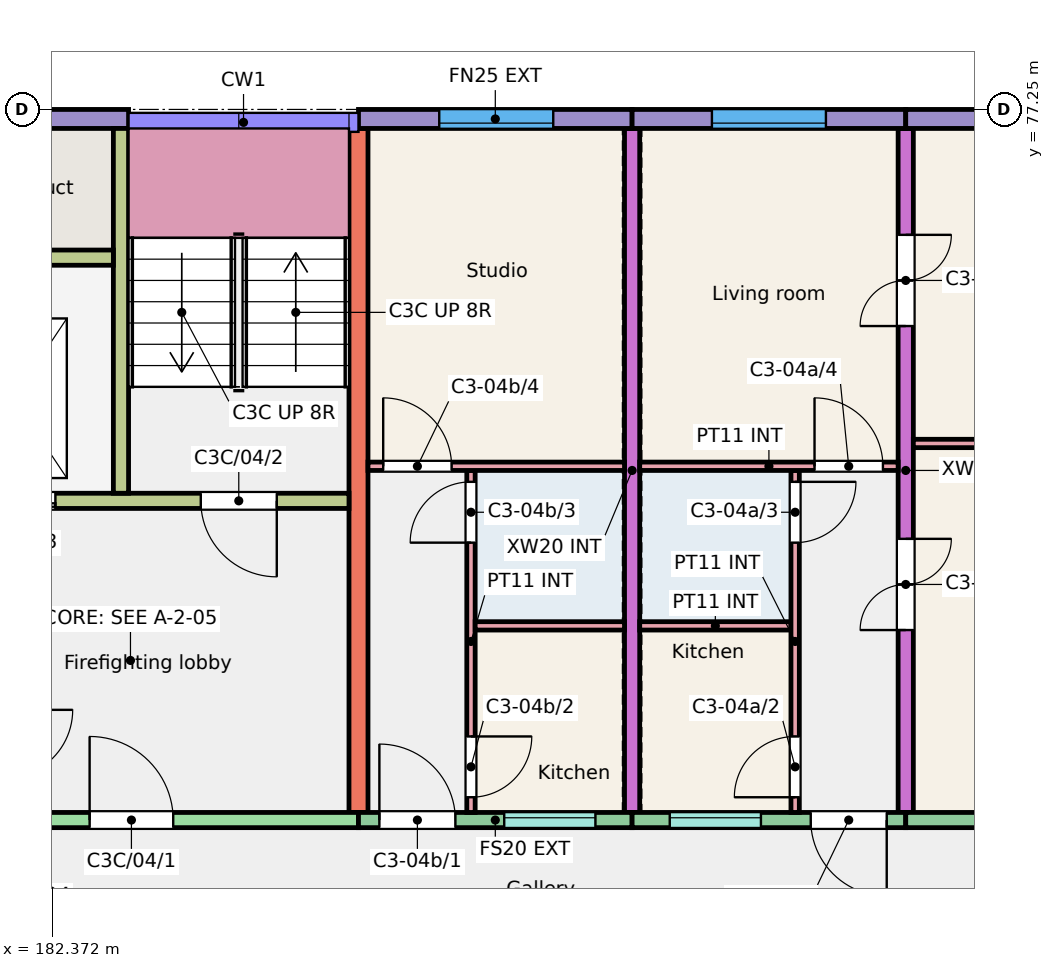
"""IFC4 building model, lengths in metres.
Left out: names, types, materials, properties, quantities, classifications, styles, units other than length and angle.
Written with IfcOpenShell. Run it as: python <this file> out.ifc"""

import sys

from ifc_helpers import new_model, si_unit, direction, frame, frame_2d, origin, place, context, subcontext, project, spatial, rectangle, extrude, element, fill, save


model = new_model("IFC4")
c1 = context("Model", 3, precision=1e-05, world=origin(), true_north=direction((0.0, 1.0)))
c2 = subcontext(c1, "Body", "Model", "MODEL_VIEW")
j1 = project(units=[si_unit("LENGTHUNIT", "METRE"), si_unit("PLANEANGLEUNIT", "RADIAN")], contexts=[c1])
p1 = place(None, origin())
s1 = spatial("IfcSite", under=j1, at=p1, CompositionType="ELEMENT")
p2 = place(p1, origin())
s2 = spatial("IfcBuilding", under=s1, at=p2, CompositionType="ELEMENT")
p3 = place(p2, frame((0.0, 0.0, 12.0)))
s3 = spatial("IfcBuildingStorey", under=s2, at=p3, CompositionType="ELEMENT", Elevation=12.0)
p4 = place(p3, frame((186.4, 68.0, 0.0), z_axis=(0.0, 0.0, 1.0), x_axis=(0.0, 1.0, 0.0)))
e1 = element("IfcWall", 1, at=p4, inside=s3, PredefinedType="SHEAR", context=c2, shape_type="SweptSolid", body=[
    extrude(rectangle(XDim=9.0, YDim=0.25, at=frame_2d((4.5, 0.0))), origin(), (0.0, 0.0, 1.0), 3.0),
])
p5 = place(p3, frame((190.0, 68.0, 0.0), z_axis=(0.0, 0.0, 1.0), x_axis=(0.0, 1.0, 0.0)))
e2 = element("IfcWall", 2, at=p5, inside=s3, PredefinedType="SHEAR", context=c2, shape_type="SweptSolid", body=[
    extrude(rectangle(XDim=9.0, YDim=0.2, at=frame_2d((4.5, 0.0))), origin(), (0.0, 0.0, 1.0), 3.0),
])
p6 = place(p3, frame((193.6, 68.0, 0.0), z_axis=(0.0, 0.0, 1.0), x_axis=(0.0, 1.0, 0.0)))
e3 = element("IfcWall", 3, at=p6, inside=s3, PredefinedType="SHEAR", context=c2, shape_type="SweptSolid", body=[
    extrude(rectangle(XDim=9.0, YDim=0.2, at=frame_2d((4.5, 0.0))), origin(), (0.0, 0.0, 1.0), 3.0),
])
p7 = place(p6, frame((2.4, 0.0, 0.0)))
e4 = element("IfcOpeningElement", 4, at=p7, cuts=e3, PredefinedType="OPENING", context=c2, shape_type="SweptSolid", body=[
    extrude(rectangle(XDim=1.2, YDim=2.1, at=frame_2d((0.6, 1.05))), frame((0.0, 0.11, 0.0), z_axis=(0.0, -1.0, 0.0), x_axis=(1.0, 0.0, 0.0)), (0.0, 0.0, 1.0), 0.22),
])
p8 = place(p6, frame((6.4, 0.0, 0.0)))
e5 = element("IfcOpeningElement", 5, at=p8, cuts=e3, PredefinedType="OPENING", context=c2, shape_type="SweptSolid", body=[
    extrude(rectangle(XDim=1.2, YDim=2.1, at=frame_2d((0.6, 1.05))), frame((0.0, 0.11, 0.0), z_axis=(0.0, -1.0, 0.0), x_axis=(1.0, 0.0, 0.0)), (0.0, 0.0, 1.0), 0.22),
])
p9 = place(p3, frame((180.4, 77.125, 0.0), z_axis=(0.0, 0.0, 1.0), x_axis=(1.0, 0.0, 0.0)))
e6 = element("IfcWall", 6, at=p9, inside=s3, PredefinedType="SOLIDWALL", context=c2, shape_type="SweptSolid", body=[
    extrude(rectangle(XDim=2.975, YDim=0.25, at=frame_2d((1.488, 0.0))), origin(), (0.0, 0.0, 1.0), 3.0),
])
p10 = place(p3, frame((180.55, 67.9, 0.0), z_axis=(0.0, 0.0, 1.0), x_axis=(1.0, 0.0, 0.0)))
e7 = element("IfcWall", 7, at=p10, inside=s3, PredefinedType="SHEAR", context=c2, shape_type="SweptSolid", body=[
    extrude(rectangle(XDim=5.85, YDim=0.2, at=frame_2d((2.925, 0.0))), origin(), (0.0, 0.0, 1.0), 3.0),
])
p11 = place(p10, frame((2.312, 0.0, 0.0)))
e8 = element("IfcOpeningElement", 8, at=p11, cuts=e7, PredefinedType="OPENING", context=c2, shape_type="SweptSolid", body=[
    extrude(rectangle(XDim=1.1, YDim=2.1, at=frame_2d((0.55, 1.05))), frame((0.0, 0.11, 0.0), z_axis=(0.0, -1.0, 0.0), x_axis=(1.0, 0.0, 0.0)), (0.0, 0.0, 1.0), 0.22),
])
p12 = place(p3, frame((180.55, 72.1, 0.0), z_axis=(0.0, 0.0, 1.0), x_axis=(1.0, 0.0, 0.0)))
e9 = element("IfcWall", 9, at=p12, inside=s3, PredefinedType="SHEAR", context=c2, shape_type="SweptSolid", body=[
    extrude(rectangle(XDim=5.725, YDim=0.2, at=frame_2d((2.862, 0.0))), origin(), (0.0, 0.0, 1.0), 3.0),
])
p13 = place(p12, frame((3.775, 0.0, 0.0)))
e10 = element("IfcOpeningElement", 10, at=p13, cuts=e9, PredefinedType="OPENING", context=c2, shape_type="SweptSolid", body=[
    extrude(rectangle(XDim=1.0, YDim=2.1, at=frame_2d((0.5, 1.05))), frame((0.0, 0.11, 0.0), z_axis=(0.0, -1.0, 0.0), x_axis=(1.0, 0.0, 0.0)), (0.0, 0.0, 1.0), 0.22),
])
p14 = place(p12, frame((0.762, 0.0, 0.0)))
e11 = element("IfcOpeningElement", 11, at=p14, cuts=e9, PredefinedType="OPENING", context=c2, shape_type="SweptSolid", body=[
    extrude(rectangle(XDim=1.1, YDim=2.1, at=frame_2d((0.55, 1.05))), frame((0.0, 0.11, 0.0), z_axis=(0.0, -1.0, 0.0), x_axis=(1.0, 0.0, 0.0)), (0.0, 0.0, 1.0), 0.22),
])
p15 = place(p3, frame((183.275, 72.2, 0.0), z_axis=(0.0, 0.0, 1.0), x_axis=(0.0, 1.0, 0.0)))
e12 = element("IfcWall", 12, at=p15, inside=s3, PredefinedType="SHEAR", context=c2, shape_type="SweptSolid", body=[
    extrude(rectangle(XDim=4.8, YDim=0.2, at=frame_2d((2.4, 0.0))), origin(), (0.0, 0.0, 1.0), 3.0),
])
p16 = place(p3, frame((180.55, 75.3, 0.0), z_axis=(0.0, 0.0, 1.0), x_axis=(1.0, 0.0, 0.0)))
e13 = element("IfcWall", 13, at=p16, inside=s3, PredefinedType="SHEAR", context=c2, shape_type="SweptSolid", body=[
    extrude(rectangle(XDim=2.625, YDim=0.2, at=frame_2d((1.312, 0.0))), origin(), (0.0, 0.0, 1.0), 3.0),
])
p17 = place(p3, frame((186.4, 77.125, 0.0), z_axis=(0.0, 0.0, 1.0), x_axis=(1.0, 0.0, 0.0)))
e14 = element("IfcWall", 14, at=p17, inside=s3, PredefinedType="SOLIDWALL", context=c2, shape_type="SweptSolid", body=[
    extrude(rectangle(XDim=3.6, YDim=0.25, at=frame_2d((1.8, 0.0))), origin(), (0.0, 0.0, 1.0), 3.0),
])
p18 = place(p17, frame((1.062, 0.0, 0.9)))
e15 = element("IfcOpeningElement", 15, at=p18, cuts=e14, PredefinedType="OPENING", context=c2, shape_type="SweptSolid", body=[
    extrude(rectangle(XDim=1.5, YDim=1.5, at=frame_2d((0.75, 0.75))), frame((0.0, 0.135, 0.0), z_axis=(0.0, -1.0, 0.0), x_axis=(1.0, 0.0, 0.0)), (0.0, 0.0, 1.0), 0.27),
])
p19 = place(p3, frame((186.4, 67.9, 0.0), z_axis=(0.0, 0.0, 1.0), x_axis=(1.0, 0.0, 0.0)))
e16 = element("IfcWall", 16, at=p19, inside=s3, PredefinedType="SOLIDWALL", context=c2, shape_type="SweptSolid", body=[
    extrude(rectangle(XDim=3.6, YDim=0.2, at=frame_2d((1.8, 0.0))), origin(), (0.0, 0.0, 1.0), 3.0),
])
p20 = place(p19, frame((1.917, 0.0, 1.1)))
e17 = element("IfcOpeningElement", 17, at=p20, cuts=e16, PredefinedType="OPENING", context=c2, shape_type="SweptSolid", body=[
    extrude(rectangle(XDim=1.2, YDim=1.3, at=frame_2d((0.6, 0.65))), frame((0.0, 0.11, 0.0), z_axis=(0.0, -1.0, 0.0), x_axis=(1.0, 0.0, 0.0)), (0.0, 0.0, 1.0), 0.22),
])
p21 = place(p19, frame((0.275, 0.0, 0.0)))
e18 = element("IfcOpeningElement", 18, at=p21, cuts=e16, PredefinedType="OPENING", context=c2, shape_type="SweptSolid", body=[
    extrude(rectangle(XDim=1.0, YDim=2.1, at=frame_2d((0.5, 1.05))), frame((0.0, 0.11, 0.0), z_axis=(0.0, -1.0, 0.0), x_axis=(1.0, 0.0, 0.0)), (0.0, 0.0, 1.0), 0.22),
])
p22 = place(p3, frame((190.0, 77.125, 0.0), z_axis=(0.0, 0.0, 1.0), x_axis=(1.0, 0.0, 0.0)))
e19 = element("IfcWall", 19, at=p22, inside=s3, PredefinedType="SOLIDWALL", context=c2, shape_type="SweptSolid", body=[
    extrude(rectangle(XDim=3.6, YDim=0.25, at=frame_2d((1.8, 0.0))), origin(), (0.0, 0.0, 1.0), 3.0),
])
p23 = place(p22, frame((1.05, 0.0, 0.9)))
e20 = element("IfcOpeningElement", 20, at=p23, cuts=e19, PredefinedType="OPENING", context=c2, shape_type="SweptSolid", body=[
    extrude(rectangle(XDim=1.5, YDim=1.5, at=frame_2d((0.75, 0.75))), frame((0.0, 0.135, 0.0), z_axis=(0.0, -1.0, 0.0), x_axis=(1.0, 0.0, 0.0)), (0.0, 0.0, 1.0), 0.27),
])
p24 = place(p3, frame((190.0, 67.9, 0.0), z_axis=(0.0, 0.0, 1.0), x_axis=(1.0, 0.0, 0.0)))
e21 = element("IfcWall", 21, at=p24, inside=s3, PredefinedType="SOLIDWALL", context=c2, shape_type="SweptSolid", body=[
    extrude(rectangle(XDim=3.6, YDim=0.2, at=frame_2d((1.8, 0.0))), origin(), (0.0, 0.0, 1.0), 3.0),
])
p25 = place(p24, frame((0.495, 0.0, 1.1)))
e22 = element("IfcOpeningElement", 22, at=p25, cuts=e21, PredefinedType="OPENING", context=c2, shape_type="SweptSolid", body=[
    extrude(rectangle(XDim=1.2, YDim=1.3, at=frame_2d((0.6, 0.65))), frame((0.0, 0.11, 0.0), z_axis=(0.0, -1.0, 0.0), x_axis=(1.0, 0.0, 0.0)), (0.0, 0.0, 1.0), 0.22),
])
p26 = place(p24, frame((2.35, 0.0, 0.0)))
e23 = element("IfcOpeningElement", 23, at=p26, cuts=e21, PredefinedType="OPENING", context=c2, shape_type="SweptSolid", body=[
    extrude(rectangle(XDim=1.0, YDim=2.1, at=frame_2d((0.5, 1.05))), frame((0.0, 0.11, 0.0), z_axis=(0.0, -1.0, 0.0), x_axis=(1.0, 0.0, 0.0)), (0.0, 0.0, 1.0), 0.22),
])
p27 = place(p3, frame((193.6, 77.125, 0.0), z_axis=(0.0, 0.0, 1.0), x_axis=(1.0, 0.0, 0.0)))
e24 = element("IfcWall", 24, at=p27, inside=s3, PredefinedType="SOLIDWALL", context=c2, shape_type="SweptSolid", body=[
    extrude(rectangle(XDim=3.6, YDim=0.25, at=frame_2d((1.8, 0.0))), origin(), (0.0, 0.0, 1.0), 3.0),
])
p28 = place(p27, frame((1.025, 0.0, 0.9)))
e25 = element("IfcOpeningElement", 25, at=p28, cuts=e24, PredefinedType="OPENING", context=c2, shape_type="SweptSolid", body=[
    extrude(rectangle(XDim=1.5, YDim=1.5, at=frame_2d((0.75, 0.75))), frame((0.0, 0.135, 0.0), z_axis=(0.0, -1.0, 0.0), x_axis=(1.0, 0.0, 0.0)), (0.0, 0.0, 1.0), 0.27),
])
p29 = place(p3, frame((193.6, 67.9, 0.0), z_axis=(0.0, 0.0, 1.0), x_axis=(1.0, 0.0, 0.0)))
e26 = element("IfcWall", 26, at=p29, inside=s3, PredefinedType="SOLIDWALL", context=c2, shape_type="SweptSolid", body=[
    extrude(rectangle(XDim=3.45, YDim=0.2, at=frame_2d((1.725, 0.0))), origin(), (0.0, 0.0, 1.0), 3.0),
])
p30 = place(p29, frame((1.025, 0.0, 0.9)))
e27 = element("IfcOpeningElement", 27, at=p30, cuts=e26, PredefinedType="OPENING", context=c2, shape_type="SweptSolid", body=[
    extrude(rectangle(XDim=1.5, YDim=1.5, at=frame_2d((0.75, 0.75))), frame((0.0, 0.11, 0.0), z_axis=(0.0, -1.0, 0.0), x_axis=(1.0, 0.0, 0.0)), (0.0, 0.0, 1.0), 0.22),
])
p31 = place(p3, frame((190.1, 70.455, 0.0), z_axis=(0.0, 0.0, 1.0), x_axis=(1.0, 0.0, 0.0)))
e28 = element("IfcWall", 28, at=p31, inside=s3, PredefinedType="PARTITIONING", context=c2, shape_type="SweptSolid", body=[
    extrude(rectangle(XDim=1.99, YDim=0.11, at=frame_2d((0.995, 0.0))), origin(), (0.0, 0.0, 1.0), 2.8),
])
p32 = place(p3, frame((192.145, 68.0, 0.0), z_axis=(0.0, 0.0, 1.0), x_axis=(0.0, 1.0, 0.0)))
e29 = element("IfcWall", 29, at=p32, inside=s3, PredefinedType="PARTITIONING", context=c2, shape_type="SweptSolid", body=[
    extrude(rectangle(XDim=4.5, YDim=0.11, at=frame_2d((2.25, 0.0))), origin(), (0.0, 0.0, 1.0), 2.8),
])
p33 = place(p32, frame((0.2, 0.0, 0.0)))
e30 = element("IfcOpeningElement", 30, at=p33, cuts=e29, PredefinedType="OPENING", context=c2, shape_type="SweptSolid", body=[
    extrude(rectangle(XDim=0.8, YDim=2.1, at=frame_2d((0.4, 1.05))), frame((0.0, 0.065, 0.0), z_axis=(0.0, -1.0, 0.0), x_axis=(1.0, 0.0, 0.0)), (0.0, 0.0, 1.0), 0.13),
])
p34 = place(p32, frame((3.55, 0.0, 0.0)))
e31 = element("IfcOpeningElement", 31, at=p34, cuts=e29, PredefinedType="OPENING", context=c2, shape_type="SweptSolid", body=[
    extrude(rectangle(XDim=0.8, YDim=2.1, at=frame_2d((0.4, 1.05))), frame((0.0, 0.065, 0.0), z_axis=(0.0, -1.0, 0.0), x_axis=(1.0, 0.0, 0.0)), (0.0, 0.0, 1.0), 0.13),
])
p35 = place(p3, frame((190.1, 72.555, 0.0), z_axis=(0.0, 0.0, 1.0), x_axis=(1.0, 0.0, 0.0)))
e32 = element("IfcWall", 32, at=p35, inside=s3, PredefinedType="PARTITIONING", context=c2, shape_type="SweptSolid", body=[
    extrude(rectangle(XDim=3.4, YDim=0.11, at=frame_2d((1.7, 0.0))), origin(), (0.0, 0.0, 1.0), 2.8),
])
p36 = place(p35, frame((2.3, 0.0, 0.0)))
e33 = element("IfcOpeningElement", 33, at=p36, cuts=e32, PredefinedType="OPENING", context=c2, shape_type="SweptSolid", body=[
    extrude(rectangle(XDim=0.9, YDim=2.1, at=frame_2d((0.45, 1.05))), frame((0.0, 0.065, 0.0), z_axis=(0.0, -1.0, 0.0), x_axis=(1.0, 0.0, 0.0)), (0.0, 0.0, 1.0), 0.13),
])
p37 = place(p3, frame((193.7, 72.855, 0.0), z_axis=(0.0, 0.0, 1.0), x_axis=(1.0, 0.0, 0.0)))
e34 = element("IfcWall", 34, at=p37, inside=s3, PredefinedType="PARTITIONING", context=c2, shape_type="SweptSolid", body=[
    extrude(rectangle(XDim=3.35, YDim=0.11, at=frame_2d((1.675, 0.0))), origin(), (0.0, 0.0, 1.0), 2.8),
])
p38 = place(p3, frame((187.88, 68.0, 0.0), z_axis=(0.0, 0.0, 1.0), x_axis=(0.0, 1.0, 0.0)))
e35 = element("IfcWall", 35, at=p38, inside=s3, PredefinedType="PARTITIONING", context=c2, shape_type="SweptSolid", body=[
    extrude(rectangle(XDim=4.5, YDim=0.11, at=frame_2d((2.25, 0.0))), origin(), (0.0, 0.0, 1.0), 2.8),
])
p39 = place(p38, frame((0.2, 0.0, 0.0)))
e36 = element("IfcOpeningElement", 36, at=p39, cuts=e35, PredefinedType="OPENING", context=c2, shape_type="SweptSolid", body=[
    extrude(rectangle(XDim=0.8, YDim=2.1, at=frame_2d((0.4, 1.05))), frame((0.0, 0.065, 0.0), z_axis=(0.0, -1.0, 0.0), x_axis=(1.0, 0.0, 0.0)), (0.0, 0.0, 1.0), 0.13),
])
p40 = place(p38, frame((3.55, 0.0, 0.0)))
e37 = element("IfcOpeningElement", 37, at=p40, cuts=e35, PredefinedType="OPENING", context=c2, shape_type="SweptSolid", body=[
    extrude(rectangle(XDim=0.8, YDim=2.1, at=frame_2d((0.4, 1.05))), frame((0.0, 0.065, 0.0), z_axis=(0.0, -1.0, 0.0), x_axis=(1.0, 0.0, 0.0)), (0.0, 0.0, 1.0), 0.13),
])
p41 = place(p3, frame((187.935, 70.455, 0.0), z_axis=(0.0, 0.0, 1.0), x_axis=(1.0, 0.0, 0.0)))
e38 = element("IfcWall", 38, at=p41, inside=s3, PredefinedType="PARTITIONING", context=c2, shape_type="SweptSolid", body=[
    extrude(rectangle(XDim=1.965, YDim=0.11, at=frame_2d((0.982, 0.0))), origin(), (0.0, 0.0, 1.0), 2.8),
])
p42 = place(p3, frame((186.525, 72.555, 0.0), z_axis=(0.0, 0.0, 1.0), x_axis=(1.0, 0.0, 0.0)))
e39 = element("IfcWall", 39, at=p42, inside=s3, PredefinedType="PARTITIONING", context=c2, shape_type="SweptSolid", body=[
    extrude(rectangle(XDim=3.375, YDim=0.11, at=frame_2d((1.688, 0.0))), origin(), (0.0, 0.0, 1.0), 2.8),
])
p43 = place(p42, frame((0.2, 0.0, 0.0)))
e40 = element("IfcOpeningElement", 40, at=p43, cuts=e39, PredefinedType="OPENING", context=c2, shape_type="SweptSolid", body=[
    extrude(rectangle(XDim=0.9, YDim=2.1, at=frame_2d((0.45, 1.05))), frame((0.0, 0.065, 0.0), z_axis=(0.0, -1.0, 0.0), x_axis=(1.0, 0.0, 0.0)), (0.0, 0.0, 1.0), 0.13),
])
p44 = place(p25, origin())
e41 = element("IfcWindow", 41, at=p44, inside=s3, PartitioningType="SINGLE_PANEL", PredefinedType="WINDOW", context=c2, shape_type="SweptSolid", body=[
    extrude(rectangle(XDim=1.2, YDim=1.3, at=frame_2d((0.6, 0.65))), frame((0.0, 0.06, 0.0), z_axis=(0.0, -1.0, 0.0), x_axis=(1.0, 0.0, 0.0)), (0.0, 0.0, 1.0), 0.06),
])
fill(e22, e41)
p45 = place(p23, origin())
e42 = element("IfcWindow", 42, at=p45, inside=s3, PartitioningType="SINGLE_PANEL", PredefinedType="WINDOW", context=c2, shape_type="SweptSolid", body=[
    extrude(rectangle(XDim=1.5, YDim=1.5, at=frame_2d((0.75, 0.75))), frame((0.0, -0.025, 0.0), z_axis=(0.0, -1.0, 0.0), x_axis=(1.0, 0.0, 0.0)), (0.0, 0.0, 1.0), 0.06),
])
fill(e20, e42)
p46 = place(p20, origin())
e43 = element("IfcWindow", 43, at=p46, inside=s3, PartitioningType="SINGLE_PANEL", PredefinedType="WINDOW", context=c2, shape_type="SweptSolid", body=[
    extrude(rectangle(XDim=1.2, YDim=1.3, at=frame_2d((0.6, 0.65))), frame((0.0, 0.06, 0.0), z_axis=(0.0, -1.0, 0.0), x_axis=(1.0, 0.0, 0.0)), (0.0, 0.0, 1.0), 0.06),
])
fill(e17, e43)
p47 = place(p18, origin())
e44 = element("IfcWindow", 44, at=p47, inside=s3, PartitioningType="SINGLE_PANEL", PredefinedType="WINDOW", context=c2, shape_type="SweptSolid", body=[
    extrude(rectangle(XDim=1.5, YDim=1.5, at=frame_2d((0.75, 0.75))), frame((0.0, -0.025, 0.0), z_axis=(0.0, -1.0, 0.0), x_axis=(1.0, 0.0, 0.0)), (0.0, 0.0, 1.0), 0.06),
])
fill(e15, e44)
p48 = place(p26, origin())
e45 = element("IfcDoor", 45, at=p48, inside=s3, OperationType="SINGLE_SWING_RIGHT", PredefinedType="DOOR", context=c2, shape_type="SweptSolid", body=[
    extrude(rectangle(XDim=1.0, YDim=2.1, at=frame_2d((0.5, 1.05))), frame((0.0, 0.025, 0.0), z_axis=(0.0, -1.0, 0.0), x_axis=(1.0, 0.0, 0.0)), (0.0, 0.0, 1.0), 0.05),
])
fill(e23, e45)
p49 = place(p33, origin())
e46 = element("IfcDoor", 46, at=p49, inside=s3, OperationType="SINGLE_SWING_LEFT", PredefinedType="DOOR", context=c2, shape_type="SweptSolid", body=[
    extrude(rectangle(XDim=0.8, YDim=2.1, at=frame_2d((0.4, 1.05))), frame((0.0, 0.025, 0.0), z_axis=(0.0, -1.0, 0.0), x_axis=(1.0, 0.0, 0.0)), (0.0, 0.0, 1.0), 0.05),
])
fill(e30, e46)
p50 = place(p34, origin())
e47 = element("IfcDoor", 47, at=p50, inside=s3, OperationType="SINGLE_SWING_RIGHT", PredefinedType="DOOR", context=c2, shape_type="SweptSolid", body=[
    extrude(rectangle(XDim=0.8, YDim=2.1, at=frame_2d((0.4, 1.05))), frame((0.0, 0.025, 0.0), z_axis=(0.0, -1.0, 0.0), x_axis=(1.0, 0.0, 0.0)), (0.0, 0.0, 1.0), 0.05),
])
fill(e31, e47)
p51 = place(p36, origin())
e48 = element("IfcDoor", 48, at=p51, inside=s3, OperationType="SINGLE_SWING_LEFT", PredefinedType="DOOR", context=c2, shape_type="SweptSolid", body=[
    extrude(rectangle(XDim=0.9, YDim=2.1, at=frame_2d((0.45, 1.05))), frame((0.0, 0.025, 0.0), z_axis=(0.0, -1.0, 0.0), x_axis=(1.0, 0.0, 0.0)), (0.0, 0.0, 1.0), 0.05),
])
fill(e33, e48)
p52 = place(p7, origin())
e49 = element("IfcDoor", 49, at=p52, inside=s3, OperationType="DOUBLE_DOOR_SINGLE_SWING", PredefinedType="DOOR", context=c2, shape_type="SweptSolid", body=[
    extrude(rectangle(XDim=1.2, YDim=2.1, at=frame_2d((0.6, 1.05))), frame((0.0, 0.025, 0.0), z_axis=(0.0, -1.0, 0.0), x_axis=(1.0, 0.0, 0.0)), (0.0, 0.0, 1.0), 0.05),
])
fill(e4, e49)
p53 = place(p8, origin())
e50 = element("IfcDoor", 50, at=p53, inside=s3, OperationType="DOUBLE_DOOR_SINGLE_SWING", PredefinedType="DOOR", context=c2, shape_type="SweptSolid", body=[
    extrude(rectangle(XDim=1.2, YDim=2.1, at=frame_2d((0.6, 1.05))), frame((0.0, 0.025, 0.0), z_axis=(0.0, -1.0, 0.0), x_axis=(1.0, 0.0, 0.0)), (0.0, 0.0, 1.0), 0.05),
])
fill(e5, e50)
p54 = place(p21, origin())
e51 = element("IfcDoor", 51, at=p54, inside=s3, OperationType="SINGLE_SWING_LEFT", PredefinedType="DOOR", context=c2, shape_type="SweptSolid", body=[
    extrude(rectangle(XDim=1.0, YDim=2.1, at=frame_2d((0.5, 1.05))), frame((0.0, 0.025, 0.0), z_axis=(0.0, -1.0, 0.0), x_axis=(1.0, 0.0, 0.0)), (0.0, 0.0, 1.0), 0.05),
])
fill(e18, e51)
p55 = place(p39, origin())
e52 = element("IfcDoor", 52, at=p55, inside=s3, OperationType="SINGLE_SWING_RIGHT", PredefinedType="DOOR", context=c2, shape_type="SweptSolid", body=[
    extrude(rectangle(XDim=0.8, YDim=2.1, at=frame_2d((0.4, 1.05))), frame((0.0, 0.025, 0.0), z_axis=(0.0, -1.0, 0.0), x_axis=(1.0, 0.0, 0.0)), (0.0, 0.0, 1.0), 0.05),
])
fill(e36, e52)
p56 = place(p40, origin())
e53 = element("IfcDoor", 53, at=p56, inside=s3, OperationType="SINGLE_SWING_LEFT", PredefinedType="DOOR", context=c2, shape_type="SweptSolid", body=[
    extrude(rectangle(XDim=0.8, YDim=2.1, at=frame_2d((0.4, 1.05))), frame((0.0, 0.025, 0.0), z_axis=(0.0, -1.0, 0.0), x_axis=(1.0, 0.0, 0.0)), (0.0, 0.0, 1.0), 0.05),
])
fill(e37, e53)
p57 = place(p43, origin())
e54 = element("IfcDoor", 54, at=p57, inside=s3, OperationType="SINGLE_SWING_LEFT", PredefinedType="DOOR", context=c2, shape_type="SweptSolid", body=[
    extrude(rectangle(XDim=0.9, YDim=2.1, at=frame_2d((0.45, 1.05))), frame((0.0, 0.025, 0.0), z_axis=(0.0, -1.0, 0.0), x_axis=(1.0, 0.0, 0.0)), (0.0, 0.0, 1.0), 0.05),
])
fill(e40, e54)
p58 = place(p11, origin())
e55 = element("IfcDoor", 55, at=p58, inside=s3, OperationType="SINGLE_SWING_LEFT", PredefinedType="DOOR", context=c2, shape_type="SweptSolid", body=[
    extrude(rectangle(XDim=1.1, YDim=2.1, at=frame_2d((0.55, 1.05))), frame((0.0, 0.025, 0.0), z_axis=(0.0, -1.0, 0.0), x_axis=(1.0, 0.0, 0.0)), (0.0, 0.0, 1.0), 0.05),
])
fill(e8, e55)
p59 = place(p13, origin())
e56 = element("IfcDoor", 56, at=p59, inside=s3, OperationType="SINGLE_SWING_RIGHT", PredefinedType="DOOR", context=c2, shape_type="SweptSolid", body=[
    extrude(rectangle(XDim=1.0, YDim=2.1, at=frame_2d((0.5, 1.05))), frame((0.0, 0.025, 0.0), z_axis=(0.0, -1.0, 0.0), x_axis=(1.0, 0.0, 0.0)), (0.0, 0.0, 1.0), 0.05),
])
fill(e10, e56)
p60 = place(p14, origin())
e57 = element("IfcDoor", 57, at=p60, inside=s3, OperationType="DOUBLE_DOOR_SLIDING", PredefinedType="DOOR", context=c2, shape_type="SweptSolid", body=[
    extrude(rectangle(XDim=1.1, YDim=2.1, at=frame_2d((0.55, 1.05))), frame((0.0, 0.025, 0.0), z_axis=(0.0, -1.0, 0.0), x_axis=(1.0, 0.0, 0.0)), (0.0, 0.0, 1.0), 0.05),
])
fill(e11, e57)
save(model, sys.argv[1])
